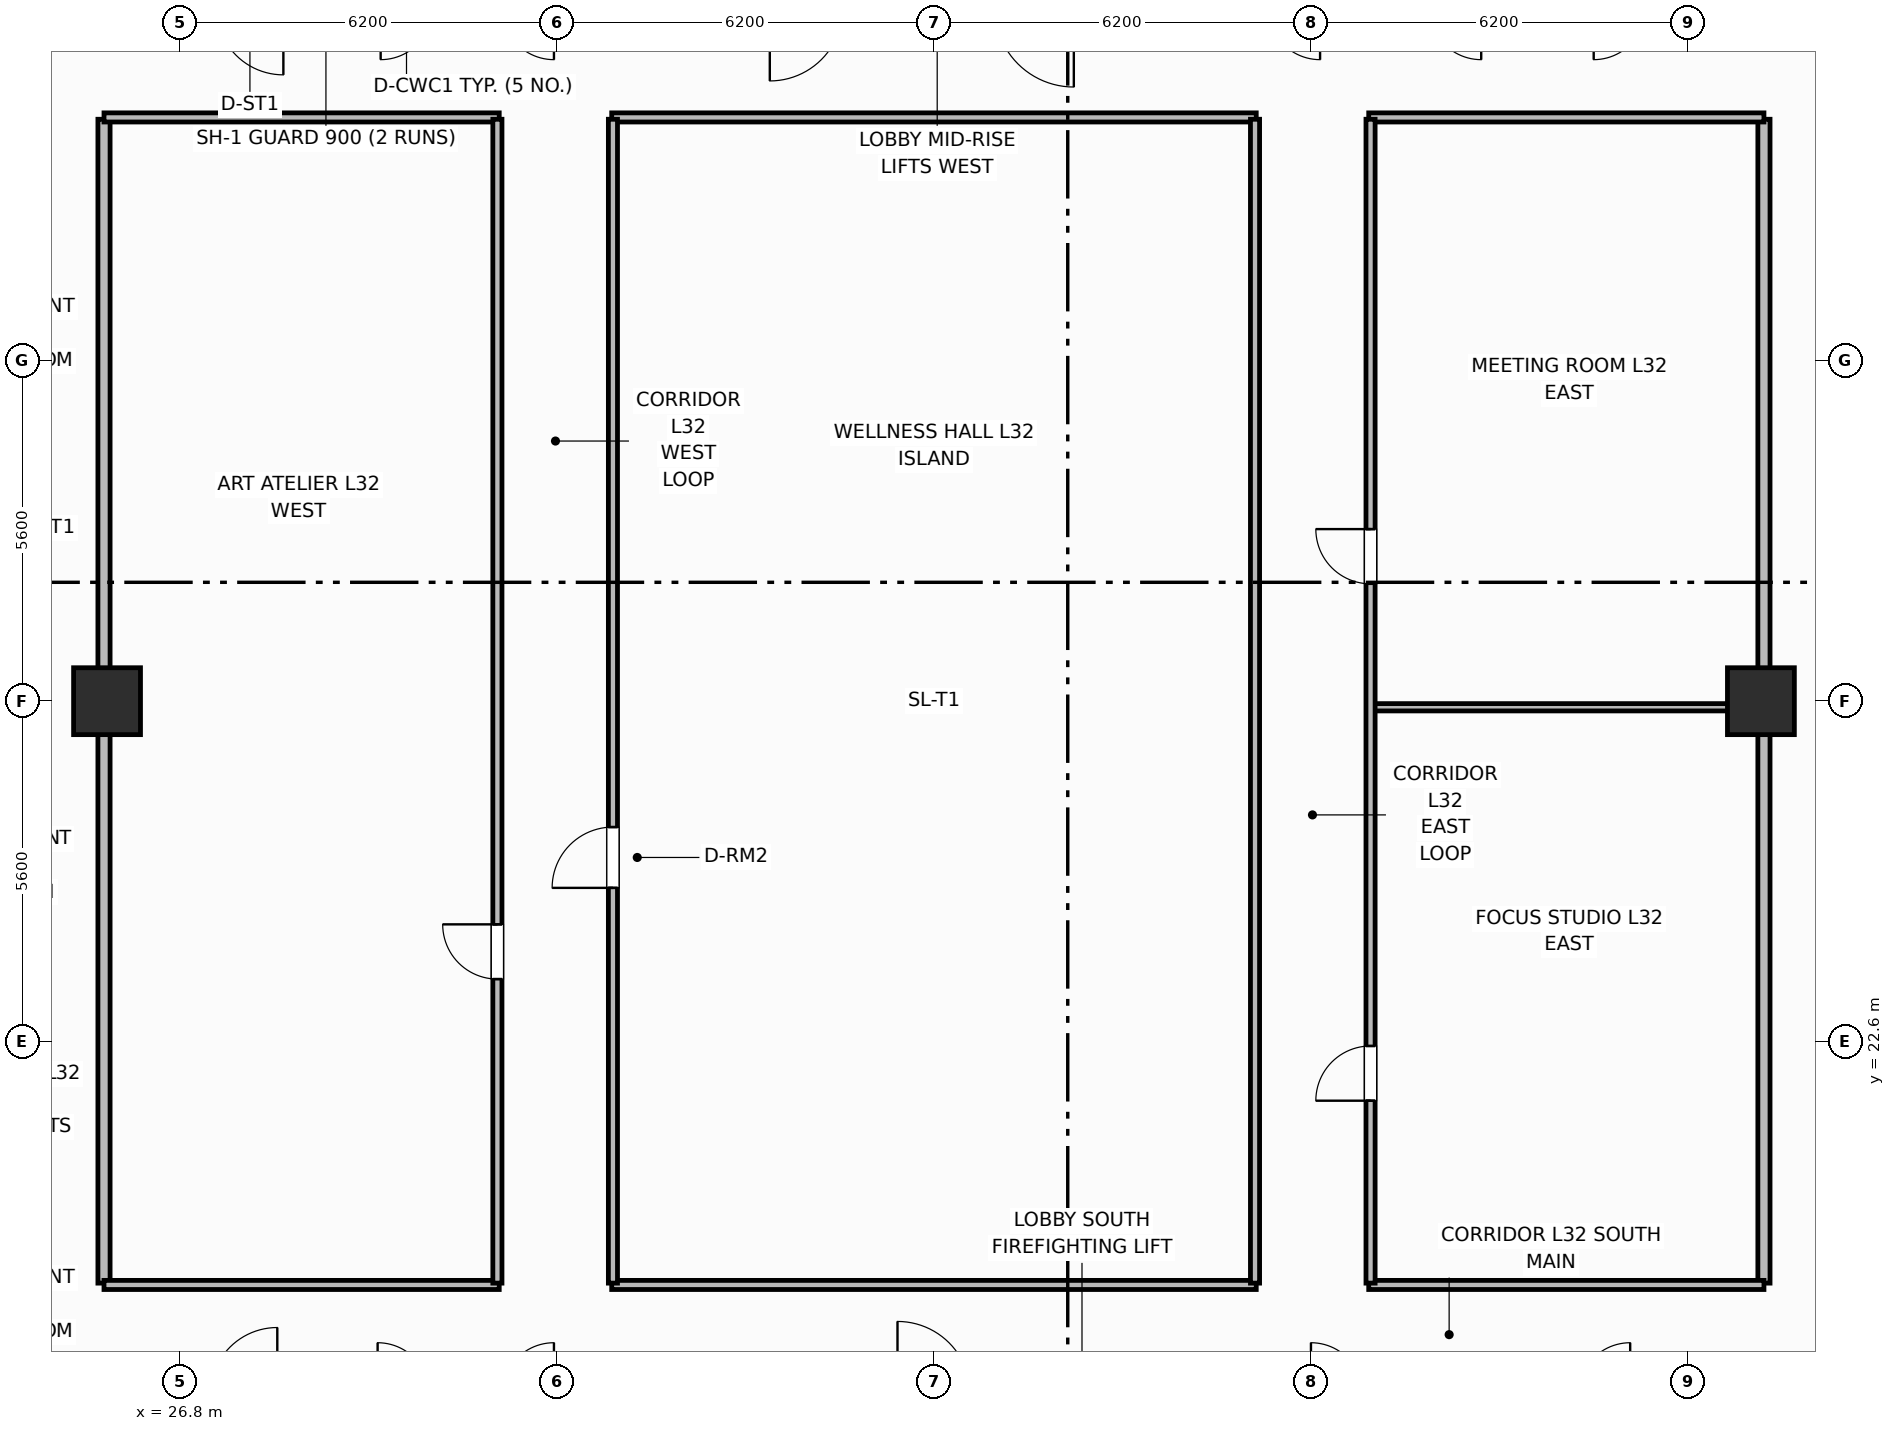
"""IFC4 building model, lengths in metres.
Left out: names, types, materials, properties, quantities, classifications, styles, units other than length and angle.
Written with IfcOpenShell. Run it as: python <this file> out.ifc"""

import sys

from ifc_helpers import new_model, si_unit, direction, frame, frame_2d, origin, origin_2d, place, context, subcontext, project, spatial, rectangle, extrude, element, fill, save


model = new_model("IFC4")
c1 = context("Model", 3, precision=1e-05, world=origin(), true_north=direction((0.0, 1.0)))
c2 = subcontext(c1, "Body", "Model", "MODEL_VIEW")
j1 = project(units=[si_unit("LENGTHUNIT", "METRE"), si_unit("PLANEANGLEUNIT", "RADIAN")], contexts=[c1])
p1 = place(None, origin())
s1 = spatial("IfcSite", under=j1, at=p1, CompositionType="ELEMENT")
p2 = place(p1, origin())
s2 = spatial("IfcBuilding", under=s1, at=p2, CompositionType="ELEMENT")
p3 = place(p2, frame((0.0, 0.0, 129.0)))
s3 = spatial("IfcBuildingStorey", under=s2, at=p3, CompositionType="ELEMENT", Elevation=129.0)
for number, where, z_axis, x_axis in (
    (1, (25.6, 28.2, 0.0), (0.0, 0.0, 1.0), (1.0, 0.0, 0.0)),
    (2, (52.8, 28.2, 0.0), (0.0, 0.0, 1.0), (1.0, 0.0, 0.0)),
):
    element("IfcColumn", number, at=place(p3, frame(where, z_axis=z_axis, x_axis=x_axis)), inside=s3, PredefinedType="COLUMN", context=c2, shape_type="SweptSolid", body=[
        extrude(rectangle(XDim=1.1, YDim=1.1, at=origin_2d()), origin(), (0.0, 0.0, 1.0), 3.7),
    ])
for number, where, z_axis, x_axis in (
    (3, (25.55, 18.63, 0.0), (0.0, 0.0, 1.0), (0.0, 1.0, 0.0)),
    (4, (52.85, 18.63, 0.0), (0.0, 0.0, 1.0), (0.0, 1.0, 0.0)),
):
    element("IfcWall", number, at=place(p3, frame(where, z_axis=z_axis, x_axis=x_axis)), inside=s3, PredefinedType="PARTITIONING", context=c2, shape_type="SweptSolid", body=[
        extrude(rectangle(XDim=19.14, YDim=0.2, at=frame_2d((9.57, 0.0))), origin(), (0.0, 0.0, 1.0), 2.53),
    ])
for number, where, z_axis, x_axis in (
    (5, (25.55, 18.6, 0.0), (0.0, 0.0, 1.0), (1.0, 0.0, 0.0)),
    (6, (25.55, 37.8, 0.0), (0.0, 0.0, 1.0), (1.0, 0.0, 0.0)),
):
    element("IfcWall", number, at=place(p3, frame(where, z_axis=z_axis, x_axis=x_axis)), inside=s3, PredefinedType="PARTITIONING", context=c2, shape_type="SweptSolid", body=[
        extrude(rectangle(XDim=6.5, YDim=0.15, at=frame_2d((3.25, 0.0))), origin(), (0.0, 0.0, 1.0), 2.53),
    ])
for number, where, z_axis, x_axis in (
    (7, (33.9, 18.6, 0.0), (0.0, 0.0, 1.0), (1.0, 0.0, 0.0)),
    (8, (33.9, 37.8, 0.0), (0.0, 0.0, 1.0), (1.0, 0.0, 0.0)),
):
    element("IfcWall", number, at=place(p3, frame(where, z_axis=z_axis, x_axis=x_axis)), inside=s3, PredefinedType="PARTITIONING", context=c2, shape_type="SweptSolid", body=[
        extrude(rectangle(XDim=10.6, YDim=0.15, at=frame_2d((5.3, 0.0))), origin(), (0.0, 0.0, 1.0), 2.53),
    ])
for number, where, z_axis, x_axis in (
    (9, (46.35, 18.6, 0.0), (0.0, 0.0, 1.0), (1.0, 0.0, 0.0)),
    (10, (46.35, 37.8, 0.0), (0.0, 0.0, 1.0), (1.0, 0.0, 0.0)),
):
    element("IfcWall", number, at=place(p3, frame(where, z_axis=z_axis, x_axis=x_axis)), inside=s3, PredefinedType="PARTITIONING", context=c2, shape_type="SweptSolid", body=[
        extrude(rectangle(XDim=6.5, YDim=0.15, at=frame_2d((3.25, 0.0))), origin(), (0.0, 0.0, 1.0), 2.53),
    ])
p4 = place(p3, frame((46.38, 28.1, 0.0), z_axis=(0.0, 0.0, 1.0), x_axis=(1.0, 0.0, 0.0)))
e11 = element("IfcWall", 11, at=p4, inside=s3, PredefinedType="PARTITIONING", context=c2, shape_type="SweptSolid", body=[
    extrude(rectangle(XDim=6.42, YDim=0.12, at=frame_2d((3.21, 0.0))), origin(), (0.0, 0.0, 1.0), 2.53),
])
p5 = place(p3, frame((32.02, 18.63, 0.0), z_axis=(0.0, 0.0, 1.0), x_axis=(0.0, 1.0, 0.0)))
e12 = element("IfcWall", 12, at=p5, inside=s3, PredefinedType="PARTITIONING", context=c2, shape_type="SweptSolid", body=[
    extrude(rectangle(XDim=19.14, YDim=0.15, at=frame_2d((9.57, 0.0))), origin(), (0.0, 0.0, 1.0), 2.53),
])
p6 = place(p5, frame((5.0, 0.0, 0.0)))
e13 = element("IfcOpeningElement", 13, at=p6, cuts=e12, PredefinedType="OPENING", context=c2, shape_type="SweptSolid", body=[
    extrude(rectangle(XDim=0.9, YDim=2.1, at=frame_2d((0.45, 1.05))), frame((0.0, 0.085, 0.0), z_axis=(0.0, -1.0, 0.0), x_axis=(1.0, 0.0, 0.0)), (0.0, 0.0, 1.0), 0.17),
])
p7 = place(p3, frame((33.92, 18.63, 0.0), z_axis=(0.0, 0.0, 1.0), x_axis=(0.0, 1.0, 0.0)))
e14 = element("IfcWall", 14, at=p7, inside=s3, PredefinedType="PARTITIONING", context=c2, shape_type="SweptSolid", body=[
    extrude(rectangle(XDim=19.14, YDim=0.15, at=frame_2d((9.57, 0.0))), origin(), (0.0, 0.0, 1.0), 2.53),
])
p8 = place(p7, frame((6.5, 0.0, 0.0)))
e15 = element("IfcOpeningElement", 15, at=p8, cuts=e14, PredefinedType="OPENING", context=c2, shape_type="SweptSolid", body=[
    extrude(rectangle(XDim=1.0, YDim=2.15, at=frame_2d((0.5, 1.075))), frame((0.0, 0.085, 0.0), z_axis=(0.0, -1.0, 0.0), x_axis=(1.0, 0.0, 0.0)), (0.0, 0.0, 1.0), 0.17),
])
p9 = place(p3, frame((44.48, 18.63, 0.0), z_axis=(0.0, 0.0, 1.0), x_axis=(0.0, 1.0, 0.0)))
e16 = element("IfcWall", 16, at=p9, inside=s3, PredefinedType="PARTITIONING", context=c2, shape_type="SweptSolid", body=[
    extrude(rectangle(XDim=19.14, YDim=0.15, at=frame_2d((9.57, 0.0))), origin(), (0.0, 0.0, 1.0), 2.53),
])
p10 = place(p3, frame((46.38, 18.63, 0.0), z_axis=(0.0, 0.0, 1.0), x_axis=(0.0, 1.0, 0.0)))
e17 = element("IfcWall", 17, at=p10, inside=s3, PredefinedType="PARTITIONING", context=c2, shape_type="SweptSolid", body=[
    extrude(rectangle(XDim=19.14, YDim=0.15, at=frame_2d((9.57, 0.0))), origin(), (0.0, 0.0, 1.0), 2.53),
])
p11 = place(p10, frame((3.0, 0.0, 0.0)))
e18 = element("IfcOpeningElement", 18, at=p11, cuts=e17, PredefinedType="OPENING", context=c2, shape_type="SweptSolid", body=[
    extrude(rectangle(XDim=0.9, YDim=2.1, at=frame_2d((0.45, 1.05))), frame((0.0, 0.085, 0.0), z_axis=(0.0, -1.0, 0.0), x_axis=(1.0, 0.0, 0.0)), (0.0, 0.0, 1.0), 0.17),
])
p12 = place(p10, frame((11.5, 0.0, 0.0)))
e19 = element("IfcOpeningElement", 19, at=p12, cuts=e17, PredefinedType="OPENING", context=c2, shape_type="SweptSolid", body=[
    extrude(rectangle(XDim=0.9, YDim=2.1, at=frame_2d((0.45, 1.05))), frame((0.0, 0.085, 0.0), z_axis=(0.0, -1.0, 0.0), x_axis=(1.0, 0.0, 0.0)), (0.0, 0.0, 1.0), 0.17),
])
p13 = place(p6, origin())
e20 = element("IfcDoor", 20, at=p13, inside=s3, OperationType="SINGLE_SWING_RIGHT", PredefinedType="DOOR", context=c2, shape_type="SweptSolid", body=[
    extrude(rectangle(XDim=0.9, YDim=2.1, at=frame_2d((0.45, 1.05))), frame((0.0, 0.025, 0.0), z_axis=(0.0, -1.0, 0.0), x_axis=(1.0, 0.0, 0.0)), (0.0, 0.0, 1.0), 0.05),
])
fill(e13, e20)
p14 = place(p8, origin())
e21 = element("IfcDoor", 21, at=p14, inside=s3, OperationType="SINGLE_SWING_LEFT", PredefinedType="DOOR", context=c2, shape_type="SweptSolid", body=[
    extrude(rectangle(XDim=1.0, YDim=2.15, at=frame_2d((0.5, 1.075))), frame((0.0, 0.025, 0.0), z_axis=(0.0, -1.0, 0.0), x_axis=(1.0, 0.0, 0.0)), (0.0, 0.0, 1.0), 0.05),
])
fill(e15, e21)
p15 = place(p11, origin())
e22 = element("IfcDoor", 22, at=p15, inside=s3, OperationType="SINGLE_SWING_LEFT", PredefinedType="DOOR", context=c2, shape_type="SweptSolid", body=[
    extrude(rectangle(XDim=0.9, YDim=2.1, at=frame_2d((0.45, 1.05))), frame((0.0, 0.025, 0.0), z_axis=(0.0, -1.0, 0.0), x_axis=(1.0, 0.0, 0.0)), (0.0, 0.0, 1.0), 0.05),
])
fill(e18, e22)
p16 = place(p12, origin())
e23 = element("IfcDoor", 23, at=p16, inside=s3, OperationType="SINGLE_SWING_RIGHT", PredefinedType="DOOR", context=c2, shape_type="SweptSolid", body=[
    extrude(rectangle(XDim=0.9, YDim=2.1, at=frame_2d((0.45, 1.05))), frame((0.0, 0.025, 0.0), z_axis=(0.0, -1.0, 0.0), x_axis=(1.0, 0.0, 0.0)), (0.0, 0.0, 1.0), 0.05),
])
fill(e19, e23)
save(model, sys.argv[1])
